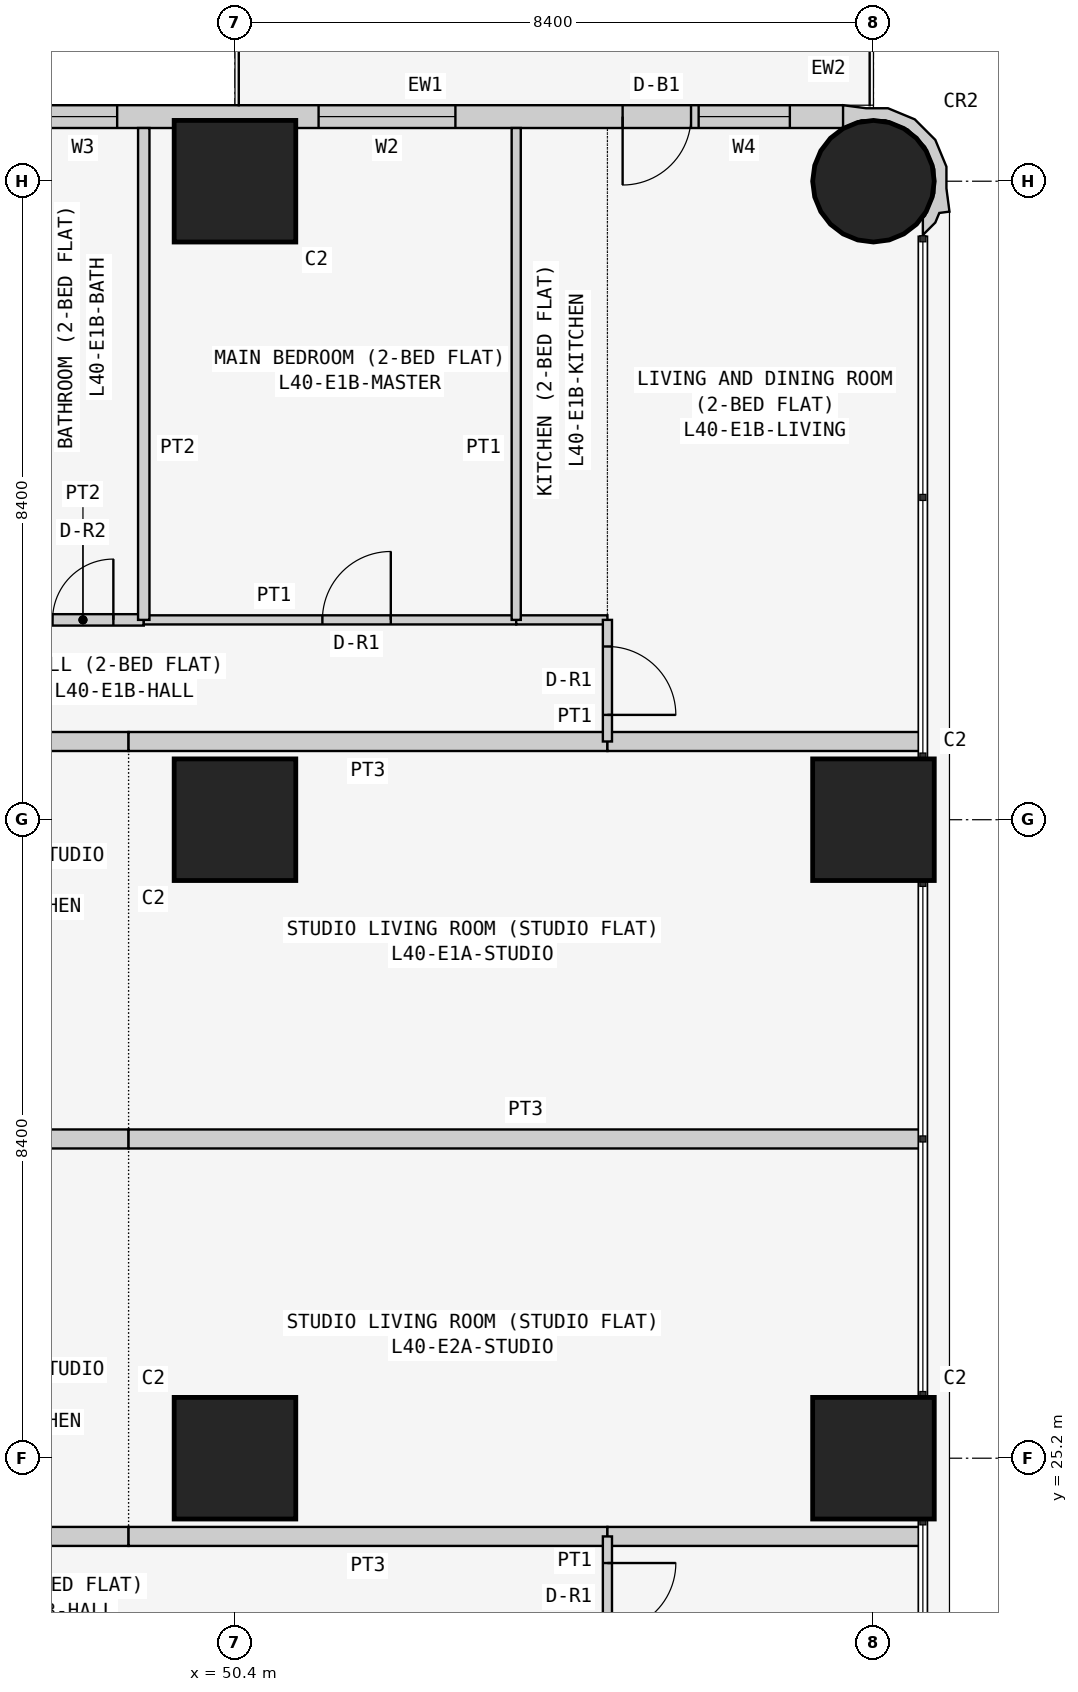
"""IFC4 building model, lengths in metres.
Left out: names, types, materials, properties, quantities, classifications, styles, units other than length and angle.
Written with IfcOpenShell. Run it as: python <this file> out.ifc"""

import sys

from ifc_helpers import new_model, si_unit, direction, frame, frame_2d, origin, origin_2d, place, context, subcontext, project, spatial, polyline, rectangle, circle, outline, extrude, element, fill, save


model = new_model("IFC4")
c1 = context("Model", 3, precision=1e-05, world=origin(), true_north=direction((0.0, 1.0)))
c2 = subcontext(c1, "Body", "Model", "MODEL_VIEW")
j1 = project(units=[si_unit("LENGTHUNIT", "METRE"), si_unit("PLANEANGLEUNIT", "RADIAN")], contexts=[c1])
p1 = place(None, origin())
s1 = spatial("IfcSite", under=j1, at=p1, CompositionType="ELEMENT")
p2 = place(p1, origin())
s2 = spatial("IfcBuilding", under=s1, at=p2, CompositionType="ELEMENT")
p3 = place(p2, frame((0.0, 0.0, 155.7)))
s3 = spatial("IfcBuildingStorey", under=s2, at=p3, CompositionType="ELEMENT", Elevation=155.7)
for number, where, z_axis, x_axis in (
    (1, (50.4, 25.2, 0.0), (0.0, 0.0, 1.0), (1.0, 0.0, 0.0)),
    (2, (50.4, 33.6, 0.0), (0.0, 0.0, 1.0), (1.0, 0.0, 0.0)),
    (3, (50.4, 42.0, 0.0), (0.0, 0.0, 1.0), (1.0, 0.0, 0.0)),
    (4, (58.8, 25.2, 0.0), (0.0, 0.0, 1.0), (1.0, 0.0, 0.0)),
    (5, (58.8, 33.6, 0.0), (0.0, 0.0, 1.0), (1.0, 0.0, 0.0)),
):
    element("IfcColumn", number, at=place(p3, frame(where, z_axis=z_axis, x_axis=x_axis)), inside=s3, PredefinedType="COLUMN", context=c2, shape_type="SweptSolid", body=[
        extrude(rectangle(XDim=1.6, YDim=1.6, at=origin_2d()), origin(), (0.0, 0.0, 1.0), 3.6),
    ])
p4 = place(p3, frame((58.8, 42.0, 0.0), z_axis=(0.0, 0.0, 1.0), x_axis=(1.0, 0.0, 0.0)))
e6 = element("IfcColumn", 6, at=p4, inside=s3, PredefinedType="COLUMN", context=c2, shape_type="SweptSolid", body=[
    extrude(circle(Radius=0.8, at=origin_2d()), origin(), (0.0, 0.0, 1.0), 3.6),
])
p5 = place(p3, frame((58.4, 42.85, 0.0), z_axis=(0.0, 0.0, 1.0), x_axis=(-1.0, 0.0, 0.0)))
e7 = element("IfcWall", 7, at=p5, inside=s3, PredefinedType="SOLIDWALL", context=c2, shape_type="SweptSolid", body=[
    extrude(rectangle(XDim=15.7, YDim=0.3, at=frame_2d((7.85, 0.0))), origin(), (0.0, 0.0, 1.0), 3.45),
])
p6 = place(p5, frame((12.4, 0.0, 0.9)))
e8 = element("IfcOpeningElement", 8, at=p6, cuts=e7, PredefinedType="OPENING", context=c2, shape_type="SweptSolid", body=[
    extrude(rectangle(XDim=1.8, YDim=1.5, at=frame_2d((0.9, 0.75))), frame((0.0, 0.16, 0.0), z_axis=(0.0, -1.0, 0.0), x_axis=(1.0, 0.0, 0.0)), (0.0, 0.0, 1.0), 0.32),
])
p7 = place(p5, frame((9.55, 0.0, 1.5)))
e9 = element("IfcOpeningElement", 9, at=p7, cuts=e7, PredefinedType="OPENING", context=c2, shape_type="SweptSolid", body=[
    extrude(rectangle(XDim=0.9, YDim=0.7, at=frame_2d((0.45, 0.35))), frame((0.0, 0.16, 0.0), z_axis=(0.0, -1.0, 0.0), x_axis=(1.0, 0.0, 0.0)), (0.0, 0.0, 1.0), 0.32),
])
p8 = place(p5, frame((5.1, 0.0, 0.9)))
e10 = element("IfcOpeningElement", 10, at=p8, cuts=e7, PredefinedType="OPENING", context=c2, shape_type="SweptSolid", body=[
    extrude(rectangle(XDim=1.8, YDim=1.5, at=frame_2d((0.9, 0.75))), frame((0.0, 0.16, 0.0), z_axis=(0.0, -1.0, 0.0), x_axis=(1.0, 0.0, 0.0)), (0.0, 0.0, 1.0), 0.32),
])
p9 = place(p5, frame((2.0, 0.0, 0.0)))
e11 = element("IfcOpeningElement", 11, at=p9, cuts=e7, PredefinedType="OPENING", context=c2, shape_type="SweptSolid", body=[
    extrude(rectangle(XDim=0.9, YDim=2.4, at=frame_2d((0.45, 1.2))), frame((0.0, 0.16, 0.0), z_axis=(0.0, -1.0, 0.0), x_axis=(1.0, 0.0, 0.0)), (0.0, 0.0, 1.0), 0.32),
])
p10 = place(p5, frame((0.7, 0.0, 0.9)))
e12 = element("IfcOpeningElement", 12, at=p10, cuts=e7, PredefinedType="OPENING", context=c2, shape_type="SweptSolid", body=[
    extrude(rectangle(XDim=1.2, YDim=1.5, at=frame_2d((0.6, 0.75))), frame((0.0, 0.16, 0.0), z_axis=(0.0, -1.0, 0.0), x_axis=(1.0, 0.0, 0.0)), (0.0, 0.0, 1.0), 0.32),
])
p11 = place(p3, frame((59.395, 41.352, 0.0), z_axis=(0.0, 0.0, 1.0), x_axis=(0.93923434088, 0.343276641956, 0.0)))
e13 = element("IfcWall", 13, at=p11, inside=s3, PredefinedType="SOLIDWALL", context=c2, shape_type="SweptSolid", body=[
    extrude(outline(polyline([(0.532, 0.393), (0.631, 0.663), (0.614, 1.044), (0.453, 1.391), (0.172, 1.649), (-0.097, 1.748), (-0.369, 1.89), (-0.509, 1.621), (-0.491, 1.615), (-0.479, 1.609), (-0.211, 1.62), (0.088, 1.511), (0.323, 1.295), (0.457, 1.006), (0.47, 0.688), (0.361, 0.389), (0.145, 0.154), (0.108, 0.136), (0.031, -0.075), (0.241, 0.023), (0.333, 0.124), (0.465, 0.094), (0.532, 0.393)])), origin(), (0.0, 0.0, 1.0), 3.45),
])
for number, where, z_axis, x_axis in (
    (14, (49.0, 34.629, 0.0), (0.0, 0.0, 1.0), (-1.0, 0.0, 0.0)),
    (15, (45.4, 29.4, 0.0), (0.0, 0.0, 1.0), (1.0, 0.0, 0.0)),
):
    element("IfcWall", number, at=place(p3, frame(where, z_axis=z_axis, x_axis=x_axis)), inside=s3, PredefinedType="PARTITIONING", context=c2, shape_type="SweptSolid", body=[
        extrude(rectangle(XDim=3.6, YDim=0.25, at=frame_2d((1.8, 0.0))), origin(), (0.0, 0.0, 1.0), 3.45),
    ])
p12 = place(p3, frame((55.3, 34.629, 0.0), z_axis=(0.0, 0.0, 1.0), x_axis=(-1.0, 0.0, 0.0)))
e16 = element("IfcWall", 16, at=p12, inside=s3, PredefinedType="PARTITIONING", context=c2, shape_type="SweptSolid", body=[
    extrude(rectangle(XDim=6.3, YDim=0.25, at=frame_2d((3.15, 0.0))), origin(), (0.0, 0.0, 1.0), 3.45),
])
p13 = place(p3, frame((59.45, 34.629, 0.0), z_axis=(0.0, 0.0, 1.0), x_axis=(-1.0, 0.0, 0.0)))
e17 = element("IfcWall", 17, at=p13, inside=s3, PredefinedType="PARTITIONING", context=c2, shape_type="SweptSolid", body=[
    extrude(rectangle(XDim=4.15, YDim=0.25, at=frame_2d((2.075, 0.0))), origin(), (0.0, 0.0, 1.0), 3.45),
])
p14 = place(p3, frame((49.0, 29.4, 0.0), z_axis=(0.0, 0.0, 1.0), x_axis=(1.0, 0.0, 0.0)))
e18 = element("IfcWall", 18, at=p14, inside=s3, PredefinedType="PARTITIONING", context=c2, shape_type="SweptSolid", body=[
    extrude(rectangle(XDim=10.45, YDim=0.25, at=frame_2d((5.225, 0.0))), origin(), (0.0, 0.0, 1.0), 3.45),
])
p15 = place(p3, frame((49.2, 36.229, 0.0), z_axis=(0.0, 0.0, 1.0), x_axis=(-1.0, 0.0, 0.0)))
e19 = element("IfcWall", 19, at=p15, inside=s3, PredefinedType="PARTITIONING", context=c2, shape_type="SweptSolid", body=[
    extrude(rectangle(XDim=1.6, YDim=0.15, at=frame_2d((0.8, 0.0))), origin(), (0.0, 0.0, 1.0), 3.45),
])
p16 = place(p15, frame((0.4, 0.0, 0.0)))
e20 = element("IfcOpeningElement", 20, at=p16, cuts=e19, PredefinedType="OPENING", context=c2, shape_type="SweptSolid", body=[
    extrude(rectangle(XDim=0.8, YDim=2.1, at=frame_2d((0.4, 1.05))), frame((0.0, 0.085, 0.0), z_axis=(0.0, -1.0, 0.0), x_axis=(1.0, 0.0, 0.0)), (0.0, 0.0, 1.0), 0.17),
])
p17 = place(p3, frame((54.1, 36.229, 0.0), z_axis=(0.0, 0.0, 1.0), x_axis=(-1.0, 0.0, 0.0)))
e21 = element("IfcWall", 21, at=p17, inside=s3, PredefinedType="PARTITIONING", context=c2, shape_type="SweptSolid", body=[
    extrude(rectangle(XDim=4.9, YDim=0.12, at=frame_2d((2.45, 0.0))), origin(), (0.0, 0.0, 1.0), 3.45),
])
p18 = place(p17, frame((1.65, 0.0, 0.0)))
e22 = element("IfcOpeningElement", 22, at=p18, cuts=e21, PredefinedType="OPENING", context=c2, shape_type="SweptSolid", body=[
    extrude(rectangle(XDim=0.9, YDim=2.1, at=frame_2d((0.45, 1.05))), frame((0.0, 0.07, 0.0), z_axis=(0.0, -1.0, 0.0), x_axis=(1.0, 0.0, 0.0)), (0.0, 0.0, 1.0), 0.14),
])
p19 = place(p3, frame((55.3, 36.229, 0.0), z_axis=(0.0, 0.0, 1.0), x_axis=(-1.0, 0.0, 0.0)))
e23 = element("IfcWall", 23, at=p19, inside=s3, PredefinedType="PARTITIONING", context=c2, shape_type="SweptSolid", body=[
    extrude(rectangle(XDim=1.2, YDim=0.12, at=frame_2d((0.6, 0.0))), origin(), (0.0, 0.0, 1.0), 3.45),
])
p20 = place(p3, frame((55.3, 34.629, 0.0), z_axis=(0.0, 0.0, 1.0), x_axis=(0.0, 1.0, 0.0)))
e24 = element("IfcWall", 24, at=p20, inside=s3, PredefinedType="PARTITIONING", context=c2, shape_type="SweptSolid", body=[
    extrude(rectangle(XDim=1.6, YDim=0.12, at=frame_2d((0.8, 0.0))), origin(), (0.0, 0.0, 1.0), 3.45),
])
p21 = place(p20, frame((0.35, 0.0, 0.0)))
e25 = element("IfcOpeningElement", 25, at=p21, cuts=e24, PredefinedType="OPENING", context=c2, shape_type="SweptSolid", body=[
    extrude(rectangle(XDim=0.9, YDim=2.1, at=frame_2d((0.45, 1.05))), frame((0.0, 0.07, 0.0), z_axis=(0.0, -1.0, 0.0), x_axis=(1.0, 0.0, 0.0)), (0.0, 0.0, 1.0), 0.14),
])
p22 = place(p3, frame((49.2, 36.229, 0.0), z_axis=(0.0, 0.0, 1.0), x_axis=(0.0, 1.0, 0.0)))
e26 = element("IfcWall", 26, at=p22, inside=s3, PredefinedType="PARTITIONING", context=c2, shape_type="SweptSolid", body=[
    extrude(rectangle(XDim=6.471, YDim=0.15, at=frame_2d((3.235, 0.0))), origin(), (0.0, 0.0, 1.0), 3.45),
])
p23 = place(p3, frame((54.1, 36.229, 0.0), z_axis=(0.0, 0.0, 1.0), x_axis=(0.0, 1.0, 0.0)))
e27 = element("IfcWall", 27, at=p23, inside=s3, PredefinedType="PARTITIONING", context=c2, shape_type="SweptSolid", body=[
    extrude(rectangle(XDim=6.471, YDim=0.12, at=frame_2d((3.235, 0.0))), origin(), (0.0, 0.0, 1.0), 3.45),
])
p24 = place(p3, frame((49.0, 24.171, 0.0), z_axis=(0.0, 0.0, 1.0), x_axis=(-1.0, 0.0, 0.0)))
e28 = element("IfcWall", 28, at=p24, inside=s3, PredefinedType="PARTITIONING", context=c2, shape_type="SweptSolid", body=[
    extrude(rectangle(XDim=3.6, YDim=0.25, at=frame_2d((1.8, 0.0))), origin(), (0.0, 0.0, 1.0), 3.45),
])
p25 = place(p3, frame((55.3, 24.171, 0.0), z_axis=(0.0, 0.0, 1.0), x_axis=(-1.0, 0.0, 0.0)))
e29 = element("IfcWall", 29, at=p25, inside=s3, PredefinedType="PARTITIONING", context=c2, shape_type="SweptSolid", body=[
    extrude(rectangle(XDim=6.3, YDim=0.25, at=frame_2d((3.15, 0.0))), origin(), (0.0, 0.0, 1.0), 3.45),
])
p26 = place(p3, frame((59.45, 24.171, 0.0), z_axis=(0.0, 0.0, 1.0), x_axis=(-1.0, 0.0, 0.0)))
e30 = element("IfcWall", 30, at=p26, inside=s3, PredefinedType="PARTITIONING", context=c2, shape_type="SweptSolid", body=[
    extrude(rectangle(XDim=4.15, YDim=0.25, at=frame_2d((2.075, 0.0))), origin(), (0.0, 0.0, 1.0), 3.45),
])
p27 = place(p3, frame((55.3, 24.171, 0.0), z_axis=(0.0, 0.0, 1.0), x_axis=(0.0, -1.0, 0.0)))
e31 = element("IfcWall", 31, at=p27, inside=s3, PredefinedType="PARTITIONING", context=c2, shape_type="SweptSolid", body=[
    extrude(rectangle(XDim=1.6, YDim=0.12, at=frame_2d((0.8, 0.0))), origin(), (0.0, 0.0, 1.0), 3.45),
])
p28 = place(p27, frame((0.35, 0.0, 0.0)))
e32 = element("IfcOpeningElement", 32, at=p28, cuts=e31, PredefinedType="OPENING", context=c2, shape_type="SweptSolid", body=[
    extrude(rectangle(XDim=0.9, YDim=2.1, at=frame_2d((0.45, 1.05))), frame((0.0, 0.07, 0.0), z_axis=(0.0, -1.0, 0.0), x_axis=(1.0, 0.0, 0.0)), (0.0, 0.0, 1.0), 0.14),
])
p29 = place(p7, origin())
e33 = element("IfcWindow", 33, at=p29, inside=s3, PartitioningType="SINGLE_PANEL", PredefinedType="WINDOW", context=c2, shape_type="SweptSolid", body=[
    extrude(rectangle(XDim=0.9, YDim=0.7, at=frame_2d((0.45, 0.35))), frame((0.0, 0.03, 0.0), z_axis=(0.0, -1.0, 0.0), x_axis=(1.0, 0.0, 0.0)), (0.0, 0.0, 1.0), 0.06),
])
fill(e9, e33)
p30 = place(p8, origin())
e34 = element("IfcWindow", 34, at=p30, inside=s3, PartitioningType="SINGLE_PANEL", PredefinedType="WINDOW", context=c2, shape_type="SweptSolid", body=[
    extrude(rectangle(XDim=1.8, YDim=1.5, at=frame_2d((0.9, 0.75))), frame((0.0, 0.03, 0.0), z_axis=(0.0, -1.0, 0.0), x_axis=(1.0, 0.0, 0.0)), (0.0, 0.0, 1.0), 0.06),
])
fill(e10, e34)
p31 = place(p9, origin())
e35 = element("IfcDoor", 35, at=p31, inside=s3, OperationType="SINGLE_SWING_RIGHT", PredefinedType="DOOR", context=c2, shape_type="SweptSolid", body=[
    extrude(rectangle(XDim=0.9, YDim=2.4, at=frame_2d((0.45, 1.2))), frame((0.0, 0.025, 0.0), z_axis=(0.0, -1.0, 0.0), x_axis=(1.0, 0.0, 0.0)), (0.0, 0.0, 1.0), 0.05),
])
fill(e11, e35)
p32 = place(p10, origin())
e36 = element("IfcWindow", 36, at=p32, inside=s3, PartitioningType="SINGLE_PANEL", PredefinedType="WINDOW", context=c2, shape_type="SweptSolid", body=[
    extrude(rectangle(XDim=1.2, YDim=1.5, at=frame_2d((0.6, 0.75))), frame((0.0, 0.03, 0.0), z_axis=(0.0, -1.0, 0.0), x_axis=(1.0, 0.0, 0.0)), (0.0, 0.0, 1.0), 0.06),
])
fill(e12, e36)
p33 = place(p16, frame((0.8, 0.0, 0.0), z_axis=(0.0, 0.0, 1.0), x_axis=(-1.0, 0.0, 0.0)))
e37 = element("IfcDoor", 37, at=p33, inside=s3, OperationType="SINGLE_SWING_RIGHT", PredefinedType="DOOR", context=c2, shape_type="SweptSolid", body=[
    extrude(rectangle(XDim=0.8, YDim=2.1, at=frame_2d((0.4, 1.05))), frame((0.0, 0.025, 0.0), z_axis=(0.0, -1.0, 0.0), x_axis=(1.0, 0.0, 0.0)), (0.0, 0.0, 1.0), 0.05),
])
fill(e20, e37)
p34 = place(p18, frame((0.9, 0.0, 0.0), z_axis=(0.0, 0.0, 1.0), x_axis=(-1.0, 0.0, 0.0)))
e38 = element("IfcDoor", 38, at=p34, inside=s3, OperationType="SINGLE_SWING_RIGHT", PredefinedType="DOOR", context=c2, shape_type="SweptSolid", body=[
    extrude(rectangle(XDim=0.9, YDim=2.1, at=frame_2d((0.45, 1.05))), frame((0.0, 0.025, 0.0), z_axis=(0.0, -1.0, 0.0), x_axis=(1.0, 0.0, 0.0)), (0.0, 0.0, 1.0), 0.05),
])
fill(e22, e38)
p35 = place(p21, frame((0.9, 0.0, 0.0), z_axis=(0.0, 0.0, 1.0), x_axis=(-1.0, 0.0, 0.0)))
e39 = element("IfcDoor", 39, at=p35, inside=s3, OperationType="SINGLE_SWING_RIGHT", PredefinedType="DOOR", context=c2, shape_type="SweptSolid", body=[
    extrude(rectangle(XDim=0.9, YDim=2.1, at=frame_2d((0.45, 1.05))), frame((0.0, 0.025, 0.0), z_axis=(0.0, -1.0, 0.0), x_axis=(1.0, 0.0, 0.0)), (0.0, 0.0, 1.0), 0.05),
])
fill(e25, e39)
p36 = place(p28, origin())
e40 = element("IfcDoor", 40, at=p36, inside=s3, OperationType="SINGLE_SWING_LEFT", PredefinedType="DOOR", context=c2, shape_type="SweptSolid", body=[
    extrude(rectangle(XDim=0.9, YDim=2.1, at=frame_2d((0.45, 1.05))), frame((0.0, 0.025, 0.0), z_axis=(0.0, -1.0, 0.0), x_axis=(1.0, 0.0, 0.0)), (0.0, 0.0, 1.0), 0.05),
])
fill(e32, e40)
save(model, sys.argv[1])
